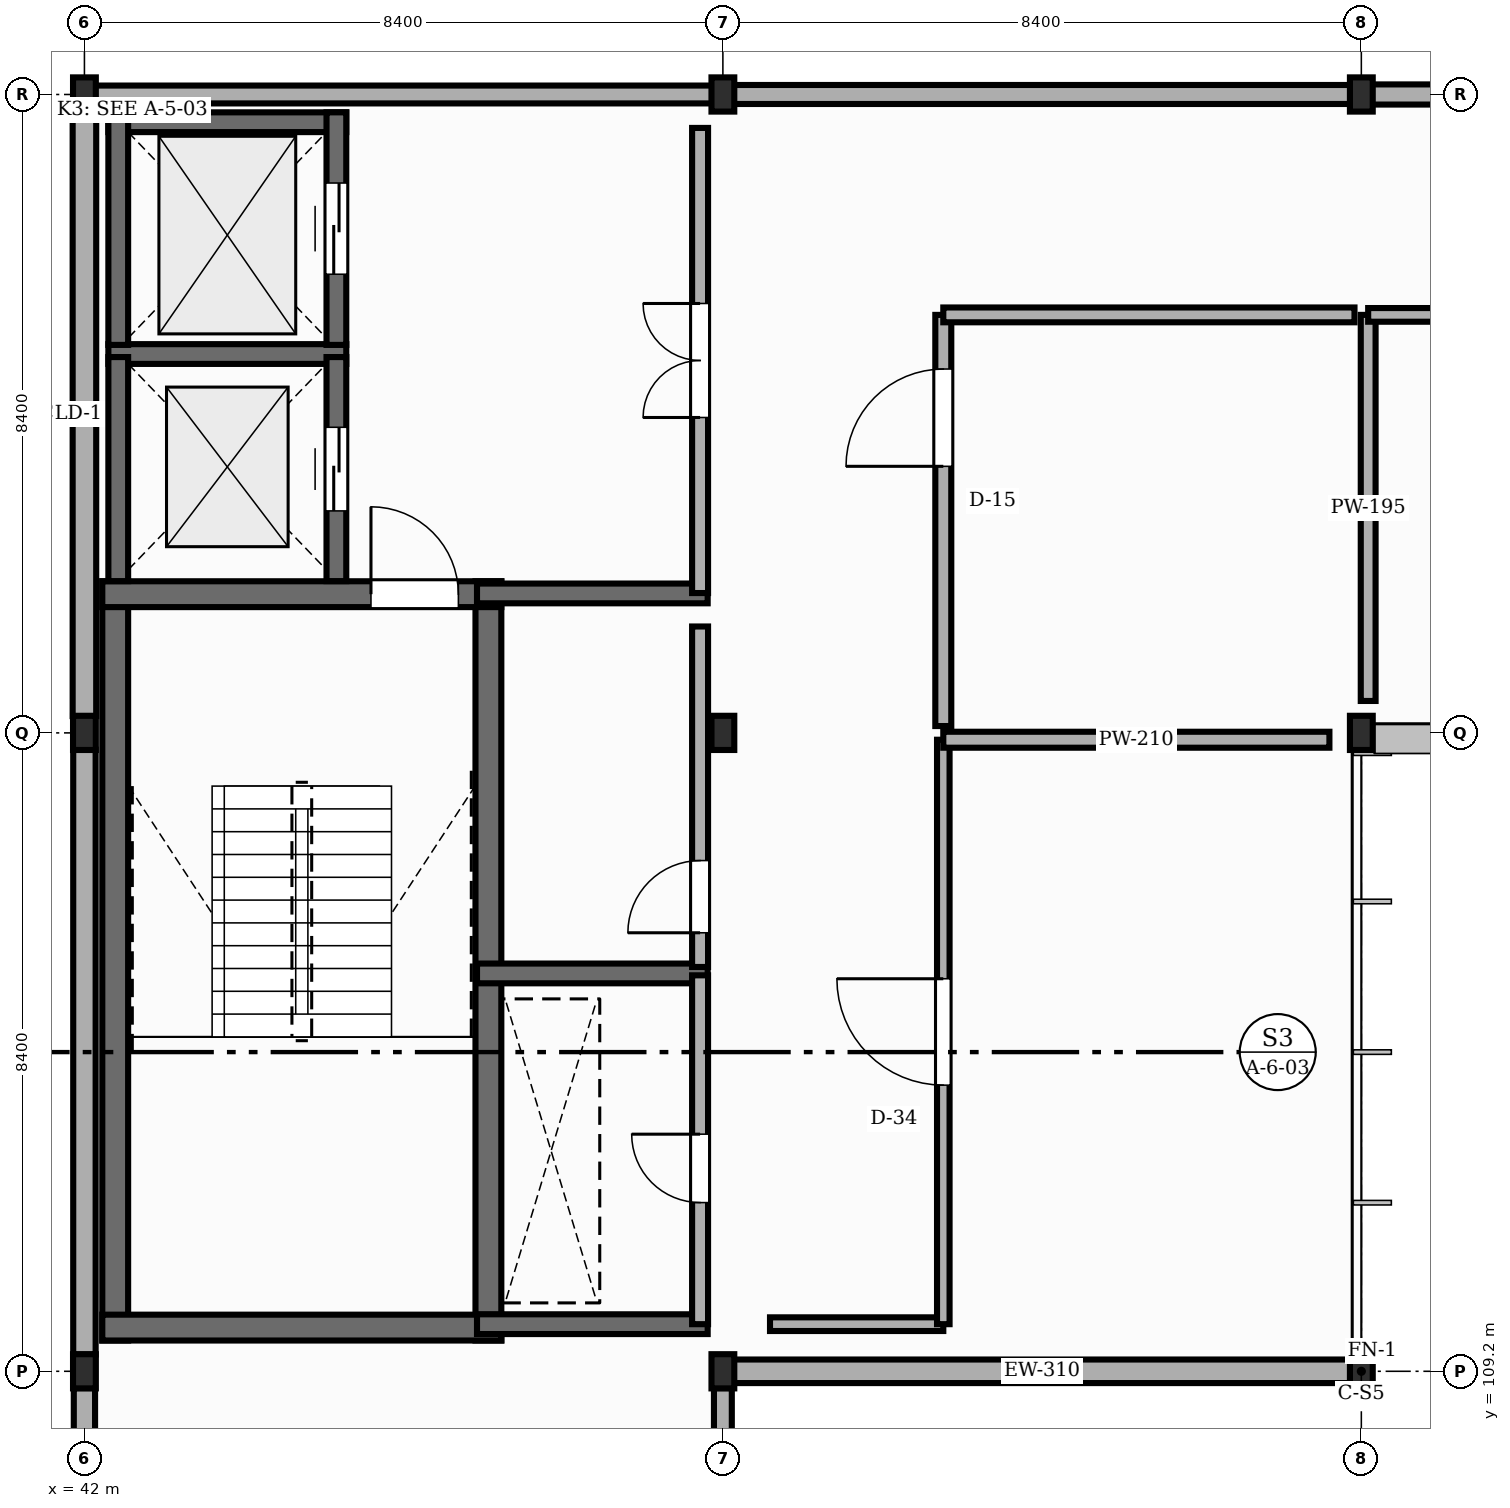
"""IFC4 building model, lengths in metres.
Left out: names, types, materials, properties, quantities, classifications, styles, units other than length and angle.
Written with IfcOpenShell. Run it as: python <this file> out.ifc"""

import sys

from ifc_helpers import new_model, si_unit, direction, frame, frame_2d, origin, origin_2d, place, context, subcontext, project, spatial, rectangle, i_section, extrude, element, fill, save


model = new_model("IFC4")
c1 = context("Model", 3, precision=1e-05, world=origin(), true_north=direction((0.0, 1.0)))
c2 = subcontext(c1, "Body", "Model", "MODEL_VIEW")
j1 = project(units=[si_unit("LENGTHUNIT", "METRE"), si_unit("PLANEANGLEUNIT", "RADIAN")], contexts=[c1])
p1 = place(None, origin())
s1 = spatial("IfcSite", under=j1, at=p1, CompositionType="ELEMENT")
p2 = place(p1, origin())
s2 = spatial("IfcBuilding", under=s1, at=p2, CompositionType="ELEMENT")
p3 = place(p2, frame((0.0, 0.0, 13.95)))
s3 = spatial("IfcBuildingStorey", under=s2, at=p3, CompositionType="ELEMENT", Elevation=13.95)
for number, where, z_axis, x_axis in (
    (1, (42.0, 109.2, 0.0), (0.0, 0.0, 1.0), (1.0, 0.0, 0.0)),
    (2, (42.0, 117.6, 0.0), (0.0, 0.0, 1.0), (1.0, 0.0, 0.0)),
    (3, (42.0, 126.0, 0.0), (0.0, 0.0, 1.0), (1.0, 0.0, 0.0)),
    (4, (50.4, 109.2, 0.0), (0.0, 0.0, 1.0), (1.0, 0.0, 0.0)),
    (5, (50.4, 117.6, 0.0), (0.0, 0.0, 1.0), (1.0, 0.0, 0.0)),
    (6, (50.4, 126.0, 0.0), (0.0, 0.0, 1.0), (1.0, 0.0, 0.0)),
    (7, (58.8, 109.2, 0.0), (0.0, 0.0, 1.0), (1.0, 0.0, 0.0)),
    (8, (58.8, 117.6, 0.0), (0.0, 0.0, 1.0), (1.0, 0.0, 0.0)),
    (9, (58.8, 126.0, 0.0), (0.0, 0.0, 1.0), (1.0, 0.0, 0.0)),
):
    element("IfcColumn", number, at=place(p3, frame(where, z_axis=z_axis, x_axis=x_axis)), inside=s3, PredefinedType="COLUMN", context=c2, shape_type="SweptSolid", body=[
        extrude(i_section(OverallWidth=0.3, OverallDepth=0.45, WebThickness=0.014, FlangeThickness=0.026, FilletRadius=0.027, at=origin_2d()), origin(), (0.0, 0.0, 1.0), 4.05),
    ])
p4 = place(p3, frame((67.192, 126.0, 0.0), z_axis=(0.0, 0.0, 1.0), x_axis=(-1.0, 0.0, 0.0)))
e10 = element("IfcWall", 10, at=p4, inside=s3, PredefinedType="STANDARD", context=c2, shape_type="SweptSolid", body=[
    extrude(rectangle(XDim=8.384, YDim=0.265, at=frame_2d((4.192, 0.0))), origin(), (0.0, 0.0, 1.0), 3.487),
])
p5 = place(p3, frame((58.792, 126.0, 0.0), z_axis=(0.0, 0.0, 1.0), x_axis=(-1.0, 0.0, 0.0)))
e11 = element("IfcWall", 11, at=p5, inside=s3, PredefinedType="STANDARD", context=c2, shape_type="SweptSolid", body=[
    extrude(rectangle(XDim=8.384, YDim=0.25, at=frame_2d((4.192, 0.0))), origin(), (0.0, 0.0, 1.0), 3.517),
])
p6 = place(p3, frame((50.392, 126.0, 0.0), z_axis=(0.0, 0.0, 1.0), x_axis=(-1.0, 0.0, 0.0)))
e12 = element("IfcWall", 12, at=p6, inside=s3, PredefinedType="STANDARD", context=c2, shape_type="SweptSolid", body=[
    extrude(rectangle(XDim=8.384, YDim=0.235, at=frame_2d((4.192, 0.0))), origin(), (0.0, 0.0, 1.0), 3.487),
])
p7 = place(p3, frame((42.0, 125.779, 0.0), z_axis=(0.0, 0.0, 1.0), x_axis=(0.0, -1.0, 0.0)))
e13 = element("IfcWall", 13, at=p7, inside=s3, PredefinedType="STANDARD", context=c2, shape_type="SweptSolid", body=[
    extrude(rectangle(XDim=7.958, YDim=0.31, at=frame_2d((3.979, 0.0))), origin(), (0.0, 0.0, 1.0), 3.577),
])
p8 = place(p3, frame((42.0, 117.379, 0.0), z_axis=(0.0, 0.0, 1.0), x_axis=(0.0, -1.0, 0.0)))
e14 = element("IfcWall", 14, at=p8, inside=s3, PredefinedType="STANDARD", context=c2, shape_type="SweptSolid", body=[
    extrude(rectangle(XDim=7.958, YDim=0.295, at=frame_2d((3.979, 0.0))), origin(), (0.0, 0.0, 1.0), 3.487),
])
p9 = place(p3, frame((42.0, 108.979, 0.0), z_axis=(0.0, 0.0, 1.0), x_axis=(0.0, -1.0, 0.0)))
e15 = element("IfcWall", 15, at=p9, inside=s3, PredefinedType="STANDARD", context=c2, shape_type="SweptSolid", body=[
    extrude(rectangle(XDim=8.013, YDim=0.28, at=frame_2d((4.006, 0.0))), origin(), (0.0, 0.0, 1.0), 3.577),
])
p10 = place(p3, frame((50.4, 100.976, 0.0), z_axis=(0.0, 0.0, 1.0), x_axis=(0.0, 1.0, 0.0)))
e16 = element("IfcWall", 16, at=p10, inside=s3, PredefinedType="STANDARD", context=c2, shape_type="SweptSolid", body=[
    extrude(rectangle(XDim=8.003, YDim=0.235, at=frame_2d((4.001, 0.0))), origin(), (0.0, 0.0, 1.0), 3.487),
])
p11 = place(p3, frame((50.408, 109.2, 0.0), z_axis=(0.0, 0.0, 1.0), x_axis=(1.0, 0.0, 0.0)))
e17 = element("IfcWall", 17, at=p11, inside=s3, PredefinedType="STANDARD", context=c2, shape_type="SweptSolid", body=[
    extrude(rectangle(XDim=8.384, YDim=0.31, at=frame_2d((4.192, 0.0))), origin(), (0.0, 0.0, 1.0), 3.517),
])
for number, where, z_axis, x_axis in (
    (18, (42.405, 109.605, 0.0), (0.0, 0.0, 1.0), (0.0, 1.0, 0.0)),
    (19, (47.315, 109.605, 0.0), (0.0, 0.0, 1.0), (0.0, 1.0, 0.0)),
):
    element("IfcWall", number, at=place(p3, frame(where, z_axis=z_axis, x_axis=x_axis)), inside=s3, PredefinedType="SHEAR", context=c2, shape_type="SweptSolid", body=[
        extrude(rectangle(XDim=9.99, YDim=0.34, at=frame_2d((4.995, 0.0))), origin(), (0.0, 0.0, 1.0), 3.85),
    ])
p12 = place(p3, frame((42.235, 109.775, 0.0), z_axis=(0.0, 0.0, 1.0), x_axis=(1.0, 0.0, 0.0)))
e20 = element("IfcWall", 20, at=p12, inside=s3, PredefinedType="SHEAR", context=c2, shape_type="SweptSolid", body=[
    extrude(rectangle(XDim=5.25, YDim=0.34, at=frame_2d((2.625, 0.0))), origin(), (0.0, 0.0, 1.0), 3.85),
])
p13 = place(p3, frame((42.235, 119.425, 0.0), z_axis=(0.0, 0.0, 1.0), x_axis=(1.0, 0.0, 0.0)))
e21 = element("IfcWall", 21, at=p13, inside=s3, PredefinedType="SHEAR", context=c2, shape_type="SweptSolid", body=[
    extrude(rectangle(XDim=5.25, YDim=0.34, at=frame_2d((2.625, 0.0))), origin(), (0.0, 0.0, 1.0), 3.85),
])
p14 = place(p13, frame((3.535, 0.0, 0.0)))
e22 = element("IfcOpeningElement", 22, at=p14, cuts=e21, PredefinedType="OPENING", context=c2, shape_type="SweptSolid", body=[
    extrude(rectangle(XDim=1.15, YDim=2.15, at=frame_2d((0.575, 1.075))), frame((0.0, 0.18, 0.0), z_axis=(0.0, -1.0, 0.0), x_axis=(1.0, 0.0, 0.0)), (0.0, 0.0, 1.0), 0.36),
])
p15 = place(p3, frame((42.315, 122.585, 0.0), z_axis=(0.0, 0.0, 1.0), x_axis=(1.0, 0.0, 0.0)))
e23 = element("IfcWall", 23, at=p15, inside=s3, PredefinedType="SHEAR", context=c2, shape_type="SweptSolid", body=[
    extrude(rectangle(XDim=3.13, YDim=0.26, at=frame_2d((1.565, 0.0))), origin(), (0.0, 0.0, 1.0), 3.85),
])
p16 = place(p3, frame((42.445, 119.597, 0.0), z_axis=(0.0, 0.0, 1.0), x_axis=(0.0, 1.0, 0.0)))
e24 = element("IfcWall", 24, at=p16, inside=s3, PredefinedType="SHEAR", context=c2, shape_type="SweptSolid", body=[
    extrude(rectangle(XDim=2.948, YDim=0.26, at=frame_2d((1.474, 0.0))), origin(), (0.0, 0.0, 1.0), 3.85),
])
p17 = place(p3, frame((45.315, 119.597, 0.0), z_axis=(0.0, 0.0, 1.0), x_axis=(0.0, 1.0, 0.0)))
e25 = element("IfcWall", 25, at=p17, inside=s3, PredefinedType="SHEAR", context=c2, shape_type="SweptSolid", body=[
    extrude(rectangle(XDim=2.948, YDim=0.26, at=frame_2d((1.474, 0.0))), origin(), (0.0, 0.0, 1.0), 3.85),
])
p18 = place(p17, frame((0.924, 0.0, 0.0)))
e26 = element("IfcOpeningElement", 26, at=p18, cuts=e25, PredefinedType="OPENING", context=c2, shape_type="SweptSolid", body=[
    extrude(rectangle(XDim=1.1, YDim=2.15, at=frame_2d((0.55, 1.075))), frame((0.0, 0.14, 0.0), z_axis=(0.0, -1.0, 0.0), x_axis=(1.0, 0.0, 0.0)), (0.0, 0.0, 1.0), 0.28),
])
p19 = place(p3, frame((42.315, 125.635, 0.0), z_axis=(0.0, 0.0, 1.0), x_axis=(1.0, 0.0, 0.0)))
e27 = element("IfcWall", 27, at=p19, inside=s3, PredefinedType="SHEAR", context=c2, shape_type="SweptSolid", body=[
    extrude(rectangle(XDim=3.13, YDim=0.26, at=frame_2d((1.565, 0.0))), origin(), (0.0, 0.0, 1.0), 3.85),
])
p20 = place(p3, frame((42.445, 122.705, 0.0), z_axis=(0.0, 0.0, 1.0), x_axis=(0.0, 1.0, 0.0)))
e28 = element("IfcWall", 28, at=p20, inside=s3, PredefinedType="SHEAR", context=c2, shape_type="SweptSolid", body=[
    extrude(rectangle(XDim=3.06, YDim=0.26, at=frame_2d((1.53, 0.0))), origin(), (0.0, 0.0, 1.0), 3.85),
])
p21 = place(p3, frame((45.315, 122.705, 0.0), z_axis=(0.0, 0.0, 1.0), x_axis=(0.0, 1.0, 0.0)))
e29 = element("IfcWall", 29, at=p21, inside=s3, PredefinedType="SHEAR", context=c2, shape_type="SweptSolid", body=[
    extrude(rectangle(XDim=3.06, YDim=0.26, at=frame_2d((1.53, 0.0))), origin(), (0.0, 0.0, 1.0), 3.85),
])
p22 = place(p21, frame((0.93, 0.0, 0.0)))
e30 = element("IfcOpeningElement", 30, at=p22, cuts=e29, PredefinedType="OPENING", context=c2, shape_type="SweptSolid", body=[
    extrude(rectangle(XDim=1.2, YDim=2.15, at=frame_2d((0.6, 1.075))), frame((0.0, 0.14, 0.0), z_axis=(0.0, -1.0, 0.0), x_axis=(1.0, 0.0, 0.0)), (0.0, 0.0, 1.0), 0.28),
])
for number, where, z_axis, x_axis in (
    (31, (47.165, 109.82, 0.0), (0.0, 0.0, 1.0), (1.0, 0.0, 0.0)),
    (32, (47.165, 114.435, 0.0), (0.0, 0.0, 1.0), (1.0, 0.0, 0.0)),
    (33, (47.165, 119.435, 0.0), (0.0, 0.0, 1.0), (1.0, 0.0, 0.0)),
):
    element("IfcWall", number, at=place(p3, frame(where, z_axis=z_axis, x_axis=x_axis)), inside=s3, PredefinedType="SHEAR", context=c2, shape_type="SweptSolid", body=[
        extrude(rectangle(XDim=3.035, YDim=0.26, at=frame_2d((1.518, 0.0))), origin(), (0.0, 0.0, 1.0), 3.85),
    ])
p23 = place(p3, frame((50.1, 109.82, 0.0), z_axis=(0.0, 0.0, 1.0), x_axis=(0.0, 1.0, 0.0)))
e34 = element("IfcWall", 34, at=p23, inside=s3, PredefinedType="STANDARD", context=c2, shape_type="SweptSolid", body=[
    extrude(rectangle(XDim=4.59, YDim=0.21, at=frame_2d((2.295, 0.0))), origin(), (0.0, 0.0, 1.0), 3.537),
])
p24 = place(p23, frame((1.6, 0.0, 0.0)))
e35 = element("IfcOpeningElement", 35, at=p24, cuts=e34, PredefinedType="OPENING", context=c2, shape_type="SweptSolid", body=[
    extrude(rectangle(XDim=0.9, YDim=2.1, at=frame_2d((0.45, 1.05))), frame((0.0, 0.115, 0.0), z_axis=(0.0, -1.0, 0.0), x_axis=(1.0, 0.0, 0.0)), (0.0, 0.0, 1.0), 0.23),
])
p25 = place(p3, frame((50.1, 114.52, 0.0), z_axis=(0.0, 0.0, 1.0), x_axis=(0.0, 1.0, 0.0)))
e36 = element("IfcWall", 36, at=p25, inside=s3, PredefinedType="STANDARD", context=c2, shape_type="SweptSolid", body=[
    extrude(rectangle(XDim=4.48, YDim=0.21, at=frame_2d((2.24, 0.0))), origin(), (0.0, 0.0, 1.0), 3.247),
])
p26 = place(p25, frame((0.45, 0.0, 0.0)))
e37 = element("IfcOpeningElement", 37, at=p26, cuts=e36, PredefinedType="OPENING", context=c2, shape_type="SweptSolid", body=[
    extrude(rectangle(XDim=0.95, YDim=2.15, at=frame_2d((0.475, 1.075))), frame((0.0, 0.115, 0.0), z_axis=(0.0, -1.0, 0.0), x_axis=(1.0, 0.0, 0.0)), (0.0, 0.0, 1.0), 0.23),
])
p27 = place(p3, frame((50.1, 119.44, 0.0), z_axis=(0.0, 0.0, 1.0), x_axis=(0.0, 1.0, 0.0)))
e38 = element("IfcWall", 38, at=p27, inside=s3, PredefinedType="STANDARD", context=c2, shape_type="SweptSolid", body=[
    extrude(rectangle(XDim=6.12, YDim=0.21, at=frame_2d((3.06, 0.0))), origin(), (0.0, 0.0, 1.0), 3.247),
])
p28 = place(p27, frame((2.31, 0.0, 0.0)))
e39 = element("IfcOpeningElement", 39, at=p28, cuts=e38, PredefinedType="OPENING", context=c2, shape_type="SweptSolid", body=[
    extrude(rectangle(XDim=1.5, YDim=2.2, at=frame_2d((0.75, 1.1))), frame((0.0, 0.115, 0.0), z_axis=(0.0, -1.0, 0.0), x_axis=(1.0, 0.0, 0.0)), (0.0, 0.0, 1.0), 0.23),
])
p29 = place(p3, frame((51.02, 109.82, -0.004), z_axis=(0.0, 0.0, 1.0), x_axis=(1.0, 0.0, 0.0)))
e40 = element("IfcWall", 40, at=p29, inside=s3, PredefinedType="STANDARD", context=c2, shape_type="SweptSolid", body=[
    extrude(rectangle(XDim=2.28, YDim=0.18, at=frame_2d((1.14, 0.0))), origin(), (0.0, 0.0, 1.0), 3.854),
])
p30 = place(p3, frame((53.3, 109.82, -0.004), z_axis=(0.0, 0.0, 1.0), x_axis=(0.0, 1.0, 0.0)))
e41 = element("IfcWall", 41, at=p30, inside=s3, PredefinedType="STANDARD", context=c2, shape_type="SweptSolid", body=[
    extrude(rectangle(XDim=7.69, YDim=0.165, at=frame_2d((3.845, 0.0))), origin(), (0.0, 0.0, 1.0), 3.551),
])
p31 = place(p30, frame((3.145, 0.0, 0.0)))
e42 = element("IfcOpeningElement", 42, at=p31, cuts=e41, PredefinedType="OPENING", context=c2, shape_type="SweptSolid", body=[
    extrude(rectangle(XDim=1.4, YDim=2.3, at=frame_2d((0.7, 1.15))), frame((0.0, 0.093, 0.0), z_axis=(0.0, -1.0, 0.0), x_axis=(1.0, 0.0, 0.0)), (0.0, 0.0, 1.0), 0.185),
])
p32 = place(p3, frame((53.3, 117.51, -0.004), z_axis=(0.0, 0.0, 1.0), x_axis=(1.0, 0.0, 0.0)))
e43 = element("IfcWall", 43, at=p32, inside=s3, PredefinedType="STANDARD", context=c2, shape_type="SweptSolid", body=[
    extrude(rectangle(XDim=5.08, YDim=0.21, at=frame_2d((2.54, 0.0))), origin(), (0.0, 0.0, 1.0), 3.301),
])
p33 = place(p3, frame((58.89, 118.02, -0.004), z_axis=(0.0, 0.0, 1.0), x_axis=(0.0, 1.0, 0.0)))
e44 = element("IfcWall", 44, at=p33, inside=s3, PredefinedType="STANDARD", context=c2, shape_type="SweptSolid", body=[
    extrude(rectangle(XDim=5.08, YDim=0.195, at=frame_2d((2.54, 0.0))), origin(), (0.0, 0.0, 1.0), 3.361),
])
p34 = place(p3, frame((58.89, 123.1, -0.004), z_axis=(0.0, 0.0, 1.0), x_axis=(1.0, 0.0, 0.0)))
e45 = element("IfcWall", 45, at=p34, inside=s3, PredefinedType="STANDARD", context=c2, shape_type="SweptSolid", body=[
    extrude(rectangle(XDim=8.22, YDim=0.18, at=frame_2d((4.11, 0.0))), origin(), (0.0, 0.0, 1.0), 3.854),
])
p35 = place(p34, frame((3.34, 0.0, 0.0)))
e46 = element("IfcOpeningElement", 46, at=p35, cuts=e45, PredefinedType="OPENING", context=c2, shape_type="SweptSolid", body=[
    extrude(rectangle(XDim=1.54, YDim=2.3, at=frame_2d((0.77, 1.15))), frame((0.0, 0.1, 0.0), z_axis=(0.0, -1.0, 0.0), x_axis=(1.0, 0.0, 0.0)), (0.0, 0.0, 1.0), 0.2),
])
p36 = place(p3, frame((53.3, 117.69, -0.004), z_axis=(0.0, 0.0, 1.0), x_axis=(0.0, 1.0, 0.0)))
e47 = element("IfcWall", 47, at=p36, inside=s3, PredefinedType="STANDARD", context=c2, shape_type="SweptSolid", body=[
    extrude(rectangle(XDim=5.41, YDim=0.21, at=frame_2d((2.705, 0.0))), origin(), (0.0, 0.0, 1.0), 3.581),
])
p37 = place(p36, frame((3.417, 0.0, 0.0)))
e48 = element("IfcOpeningElement", 48, at=p37, cuts=e47, PredefinedType="OPENING", context=c2, shape_type="SweptSolid", body=[
    extrude(rectangle(XDim=1.28, YDim=2.14, at=frame_2d((0.64, 1.07))), frame((0.0, 0.115, 0.0), z_axis=(0.0, -1.0, 0.0), x_axis=(1.0, 0.0, 0.0)), (0.0, 0.0, 1.0), 0.23),
])
p38 = place(p3, frame((53.3, 123.1, -0.004), z_axis=(0.0, 0.0, 1.0), x_axis=(1.0, 0.0, 0.0)))
e49 = element("IfcWall", 49, at=p38, inside=s3, PredefinedType="STANDARD", context=c2, shape_type="SweptSolid", body=[
    extrude(rectangle(XDim=5.41, YDim=0.195, at=frame_2d((2.705, 0.0))), origin(), (0.0, 0.0, 1.0), 3.854),
])
p39 = place(p14, origin())
e50 = element("IfcDoor", 50, at=p39, inside=s3, OperationType="SINGLE_SWING_LEFT", PredefinedType="DOOR", context=c2, shape_type="SweptSolid", body=[
    extrude(rectangle(XDim=1.15, YDim=2.15, at=frame_2d((0.575, 1.075))), frame((0.0, 0.025, 0.0), z_axis=(0.0, -1.0, 0.0), x_axis=(1.0, 0.0, 0.0)), (0.0, 0.0, 1.0), 0.05),
])
fill(e22, e50)
p40 = place(p18, origin())
e51 = element("IfcDoor", 51, at=p40, inside=s3, OperationType="DOUBLE_DOOR_SLIDING", PredefinedType="DOOR", context=c2, shape_type="SweptSolid", body=[
    extrude(rectangle(XDim=1.1, YDim=2.15, at=frame_2d((0.55, 1.075))), frame((0.0, 0.025, 0.0), z_axis=(0.0, -1.0, 0.0), x_axis=(1.0, 0.0, 0.0)), (0.0, 0.0, 1.0), 0.05),
])
fill(e26, e51)
p41 = place(p22, origin())
e52 = element("IfcDoor", 52, at=p41, inside=s3, OperationType="DOUBLE_DOOR_SLIDING", PredefinedType="DOOR", context=c2, shape_type="SweptSolid", body=[
    extrude(rectangle(XDim=1.2, YDim=2.15, at=frame_2d((0.6, 1.075))), frame((0.0, 0.025, 0.0), z_axis=(0.0, -1.0, 0.0), x_axis=(1.0, 0.0, 0.0)), (0.0, 0.0, 1.0), 0.05),
])
fill(e30, e52)
p42 = place(p24, origin())
e53 = element("IfcDoor", 53, at=p42, inside=s3, OperationType="SINGLE_SWING_RIGHT", PredefinedType="DOOR", context=c2, shape_type="SweptSolid", body=[
    extrude(rectangle(XDim=0.9, YDim=2.1, at=frame_2d((0.45, 1.05))), frame((0.0, 0.025, 0.0), z_axis=(0.0, -1.0, 0.0), x_axis=(1.0, 0.0, 0.0)), (0.0, 0.0, 1.0), 0.05),
])
fill(e35, e53)
p43 = place(p26, origin())
e54 = element("IfcDoor", 54, at=p43, inside=s3, OperationType="SINGLE_SWING_LEFT", PredefinedType="DOOR", context=c2, shape_type="SweptSolid", body=[
    extrude(rectangle(XDim=0.95, YDim=2.15, at=frame_2d((0.475, 1.075))), frame((0.0, 0.025, 0.0), z_axis=(0.0, -1.0, 0.0), x_axis=(1.0, 0.0, 0.0)), (0.0, 0.0, 1.0), 0.05),
])
fill(e37, e54)
p44 = place(p28, origin())
e55 = element("IfcDoor", 55, at=p44, inside=s3, OperationType="DOUBLE_DOOR_SINGLE_SWING", PredefinedType="DOOR", context=c2, shape_type="SweptSolid", body=[
    extrude(rectangle(XDim=1.5, YDim=2.2, at=frame_2d((0.75, 1.1))), frame((0.0, 0.025, 0.0), z_axis=(0.0, -1.0, 0.0), x_axis=(1.0, 0.0, 0.0)), (0.0, 0.0, 1.0), 0.05),
])
fill(e39, e55)
p45 = place(p31, origin())
e56 = element("IfcDoor", 56, at=p45, inside=s3, OperationType="SINGLE_SWING_RIGHT", PredefinedType="DOOR", context=c2, shape_type="SweptSolid", body=[
    extrude(rectangle(XDim=1.4, YDim=2.3, at=frame_2d((0.7, 1.15))), frame((0.0, 0.025, 0.0), z_axis=(0.0, -1.0, 0.0), x_axis=(1.0, 0.0, 0.0)), (0.0, 0.0, 1.0), 0.05),
])
fill(e42, e56)
p46 = place(p37, origin())
e57 = element("IfcDoor", 57, at=p46, inside=s3, OperationType="SINGLE_SWING_LEFT", PredefinedType="DOOR", context=c2, shape_type="SweptSolid", body=[
    extrude(rectangle(XDim=1.28, YDim=2.14, at=frame_2d((0.64, 1.07))), frame((0.0, 0.025, 0.0), z_axis=(0.0, -1.0, 0.0), x_axis=(1.0, 0.0, 0.0)), (0.0, 0.0, 1.0), 0.05),
])
fill(e48, e57)
save(model, sys.argv[1])
